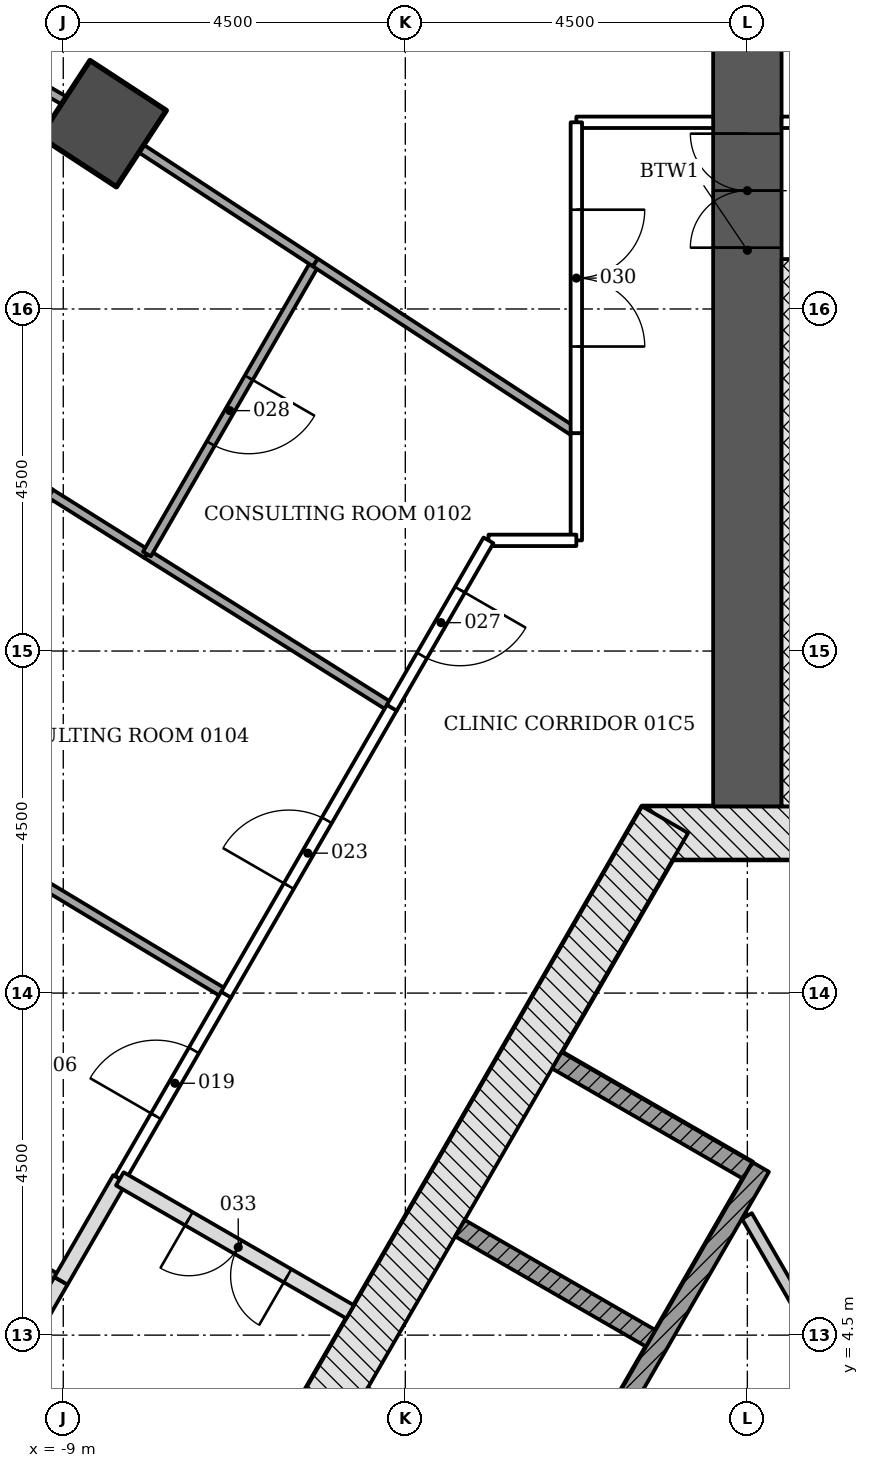
"""IFC4 building model, lengths in metres.
Left out: names, types, materials, properties, quantities, classifications, styles, units other than length and angle.
Written with IfcOpenShell. Run it as: python <this file> out.ifc"""

import sys

from ifc_helpers import new_model, si_unit, direction, frame, frame_2d, origin, origin_2d, place, context, subcontext, project, spatial, rectangle, extrude, element, fill, save


model = new_model("IFC4")
c1 = context("Model", 3, precision=1e-05, world=origin(), true_north=direction((0.0, 1.0)))
c2 = subcontext(c1, "Body", "Model", "MODEL_VIEW")
j1 = project(units=[si_unit("LENGTHUNIT", "METRE"), si_unit("PLANEANGLEUNIT", "RADIAN")], contexts=[c1])
p1 = place(None, origin())
s1 = spatial("IfcSite", under=j1, at=p1, CompositionType="ELEMENT")
p2 = place(p1, origin())
s2 = spatial("IfcBuilding", under=s1, at=p2, CompositionType="ELEMENT")
p3 = place(p2, frame((0.0, 0.0, 6.0)))
s3 = spatial("IfcBuildingStorey", under=s2, at=p3, CompositionType="ELEMENT", Elevation=6.0)
p4 = place(p3, frame((-8.475, 20.438, -0.25), z_axis=(0.0, 0.0, 1.0), x_axis=(-0.836867705394, 0.547405191489, 0.0)))
e1 = element("IfcColumn", 1, at=p4, inside=s3, PredefinedType="COLUMN", context=c2, shape_type="SweptSolid", body=[
    extrude(rectangle(XDim=1.2, YDim=1.2, at=origin_2d()), origin(), (0.0, 0.0, 1.0), 4.5),
])
p5 = place(p3, frame((1.386, 11.106, -0.25), z_axis=(0.0, 0.0, 1.0), x_axis=(-1.0, 0.0, 0.0)))
e2 = element("IfcWall", 2, at=p5, inside=s3, PredefinedType="SHEAR", context=c2, shape_type="SweptSolid", body=[
    extrude(rectangle(XDim=2.771, YDim=0.7, at=frame_2d((1.386, 0.0))), origin(), (0.0, 0.0, 1.0), 4.5),
])
p6 = place(p3, frame((-1.083, 11.281, -0.25), z_axis=(0.0, 0.0, 1.0), x_axis=(-0.500001446645, -0.866024568562, 0.0)))
e3 = element("IfcWall", 3, at=p6, inside=s3, PredefinedType="SHEAR", context=c2, shape_type="SweptSolid", body=[
    extrude(rectangle(XDim=18.458, YDim=0.7, at=frame_2d((9.229, 0.0))), origin(), (0.0, 0.0, 1.0), 4.5),
])
p7 = place(p6, frame((8.979, 0.0, 0.25)))
e4 = element("IfcOpeningElement", 4, at=p7, cuts=e3, PredefinedType="OPENING", context=c2, shape_type="SweptSolid", body=[
    extrude(rectangle(XDim=1.2, YDim=2.1, at=frame_2d((0.6, 1.05))), frame((0.0, 0.36, 0.0), z_axis=(0.0, -1.0, 0.0), x_axis=(1.0, 0.0, 0.0)), (0.0, 0.0, 1.0), 0.72),
])
p8 = place(p6, frame((11.029, 0.0, 0.25)))
e5 = element("IfcOpeningElement", 5, at=p8, cuts=e3, PredefinedType="OPENING", context=c2, shape_type="SweptSolid", body=[
    extrude(rectangle(XDim=1.2, YDim=2.1, at=frame_2d((0.6, 1.05))), frame((0.0, 0.36, 0.0), z_axis=(0.0, -1.0, 0.0), x_axis=(1.0, 0.0, 0.0)), (0.0, 0.0, 1.0), 0.72),
])
p9 = place(p3, frame((0.0, 11.456, -0.25), z_axis=(0.0, 0.0, 1.0), x_axis=(0.0, 1.0, 0.0)))
e6 = element("IfcWall", 6, at=p9, inside=s3, PredefinedType="SHEAR", context=c2, shape_type="SweptSolid", body=[
    extrude(rectangle(XDim=14.633, YDim=0.9, at=frame_2d((7.316, 0.0))), origin(), (0.0, 0.0, 1.0), 4.5),
])
p10 = place(p9, frame((7.35, 0.0, 0.25)))
e7 = element("IfcOpeningElement", 7, at=p10, cuts=e6, PredefinedType="OPENING", context=c2, shape_type="SweptSolid", body=[
    extrude(rectangle(XDim=1.5, YDim=2.1, at=frame_2d((0.75, 1.05))), frame((0.0, 0.46, 0.0), z_axis=(0.0, -1.0, 0.0), x_axis=(1.0, 0.0, 0.0)), (0.0, 0.0, 1.0), 0.92),
])
p11 = place(p3, frame((-2.506, 8.115, -0.25), z_axis=(0.0, 0.0, 1.0), x_axis=(0.865996321171, -0.50005036918, 0.0)))
e8 = element("IfcWall", 8, at=p11, inside=s3, PredefinedType="PARTITIONING", context=c2, shape_type="SweptSolid", body=[
    extrude(rectangle(XDim=2.9, YDim=0.25, at=frame_2d((1.45, 0.0))), origin(), (0.0, 0.0, 1.0), 4.5),
])
for number, where, z_axis, x_axis in (
    (9, (-3.781, 5.907, -0.25), (0.0, 0.0, 1.0), (0.866, -0.5, 0.0)),
    (10, (-5.056, 3.699, -0.25), (0.0, 0.0, 1.0), (0.866, -0.5, 0.0)),
):
    element("IfcWall", number, at=place(p3, frame(where, z_axis=z_axis, x_axis=x_axis)), inside=s3, PredefinedType="PARTITIONING", context=c2, shape_type="SweptSolid", body=[
        extrude(rectangle(XDim=2.9, YDim=0.25, at=frame_2d((1.45, 0.0))), origin(), (0.0, 0.0, 1.0), 4.5),
    ])
p12 = place(p3, frame((0.176, 6.711, 0.0), z_axis=(0.0, 0.0, 1.0), x_axis=(-0.500004227369, -0.866022963098, 0.0)))
e11 = element("IfcWall", 11, at=p12, inside=s3, PredefinedType="PARTITIONING", context=c2, shape_type="SweptSolid", body=[
    extrude(rectangle(XDim=11.8, YDim=0.25, at=frame_2d((5.9, 0.0))), origin(), (0.0, 0.0, 1.0), 4.25),
])
p13 = place(p3, frame((2.099, 2.42, 0.0), z_axis=(0.0, 0.0, 1.0), x_axis=(-0.499998449073, 0.866026299211, 0.0)))
e12 = element("IfcWall", 12, at=p13, inside=s3, PredefinedType="PARTITIONING", context=c2, shape_type="SweptSolid", body=[
    extrude(rectangle(XDim=4.211, YDim=0.15, at=frame_2d((2.106, 0.0))), origin(), (0.0, 0.0, 1.0), 4.25),
])
p14 = place(p3, frame((1.018, 11.456, -0.25), z_axis=(0.0, 0.0, 1.0), x_axis=(0.0, 1.0, 0.0)))
e13 = element("IfcWall", 13, at=p14, inside=s3, PredefinedType="SHEAR", context=c2, shape_type="SweptSolid", body=[
    extrude(rectangle(XDim=7.2, YDim=1.136, at=frame_2d((3.6, 0.0))), origin(), (0.0, 0.0, 1.0), 4.5),
])
p15 = place(p3, frame((-9.031, 5.213, 0.0), z_axis=(0.0, 0.0, 1.0), x_axis=(-0.500044734646, -0.865999574684, 0.0)))
e14 = element("IfcWall", 14, at=p15, inside=s3, PredefinedType="PARTITIONING", context=c2, shape_type="SweptSolid", body=[
    extrude(rectangle(XDim=4.35, YDim=0.2, at=frame_2d((2.175, 0.0))), origin(), (0.0, 0.0, 1.0), 3.638),
])
p16 = place(p3, frame((-8.256, 6.555, 0.0), z_axis=(0.0, 0.0, 1.0), x_axis=(-0.500177701192, -0.865922783642, 0.0)))
e15 = element("IfcWall", 15, at=p16, inside=s3, PredefinedType="PARTITIONING", context=c2, shape_type="SweptSolid", body=[
    extrude(rectangle(XDim=1.547, YDim=0.2, at=frame_2d((0.774, 0.0))), origin(), (0.0, 0.0, 1.0), 3.638),
])
p17 = place(p3, frame((-5.226, 4.806, 0.0), z_axis=(0.0, 0.0, 1.0), x_axis=(-0.865949687125, 0.500131122175, 0.0)))
e16 = element("IfcWall", 16, at=p17, inside=s3, PredefinedType="PARTITIONING", context=c2, shape_type="SweptSolid", body=[
    extrude(rectangle(XDim=3.499, YDim=0.2, at=frame_2d((1.75, 0.0))), origin(), (0.0, 0.0, 1.0), 4.25),
])
p18 = place(p17, frame((0.95, 0.0, 0.0)))
e17 = element("IfcOpeningElement", 17, at=p18, cuts=e16, PredefinedType="OPENING", context=c2, shape_type="SweptSolid", body=[
    extrude(rectangle(XDim=1.5, YDim=2.1, at=frame_2d((0.75, 1.05))), frame((0.0, 0.11, 0.0), z_axis=(0.0, -1.0, 0.0), x_axis=(1.0, 0.0, 0.0)), (0.0, 0.0, 1.0), 0.22),
])
p19 = place(p3, frame((7.136, 20.456, 0.0), z_axis=(0.0, 0.0, 1.0), x_axis=(-1.0, 0.0, 0.0)))
e18 = element("IfcWall", 18, at=p19, inside=s3, PredefinedType="PARTITIONING", context=c2, shape_type="SweptSolid", body=[
    extrude(rectangle(XDim=6.686, YDim=0.15, at=frame_2d((3.343, 0.0))), origin(), (0.0, 0.0, 1.0), 3.638),
])
p20 = place(p19, frame((2.45, 0.0, 0.0)))
e19 = element("IfcOpeningElement", 19, at=p20, cuts=e18, PredefinedType="OPENING", context=c2, shape_type="SweptSolid", body=[
    extrude(rectangle(XDim=1.8, YDim=2.1, at=frame_2d((0.9, 1.05))), frame((0.0, 0.085, 0.0), z_axis=(0.0, -1.0, 0.0), x_axis=(1.0, 0.0, 0.0)), (0.0, 0.0, 1.0), 0.17),
])
p21 = place(p3, frame((-9.032, 5.215, 0.0), z_axis=(0.0, 0.0, 1.0), x_axis=(-0.866130767322, 0.499817460578, 0.0)))
e20 = element("IfcWall", 20, at=p21, inside=s3, PredefinedType="PARTITIONING", context=c2, shape_type="SweptSolid", body=[
    extrude(rectangle(XDim=4.597, YDim=0.12, at=frame_2d((2.299, 0.0))), origin(), (0.0, 0.0, 1.0), 3.638),
])
p22 = place(p3, frame((-6.857, 8.983, 0.0), z_axis=(0.0, 0.0, 1.0), x_axis=(-0.856751730158, 0.515729069251, 0.0)))
e21 = element("IfcWall", 21, at=p22, inside=s3, PredefinedType="PARTITIONING", context=c2, shape_type="SweptSolid", body=[
    extrude(rectangle(XDim=4.598, YDim=0.12, at=frame_2d((2.299, 0.0))), origin(), (0.0, 0.0, 1.0), 3.638),
])
p23 = place(p3, frame((-8.256, 6.558, 0.0), z_axis=(0.0, 0.0, 1.0), x_axis=(0.500081734942, 0.86597820895, 0.0)))
e22 = element("IfcWall", 22, at=p23, inside=s3, PredefinedType="PARTITIONING", context=c2, shape_type="SweptSolid", body=[
    extrude(rectangle(XDim=2.804, YDim=0.15, at=frame_2d((1.402, 0.0))), origin(), (0.0, 0.0, 1.0), 3.638),
])
p24 = place(p23, frame((0.95, 0.0, 0.0)))
e23 = element("IfcOpeningElement", 23, at=p24, cuts=e22, PredefinedType="OPENING", context=c2, shape_type="SweptSolid", body=[
    extrude(rectangle(XDim=1.0, YDim=2.1, at=frame_2d((0.5, 1.05))), frame((0.0, 0.085, 0.0), z_axis=(0.0, -1.0, 0.0), x_axis=(1.0, 0.0, 0.0)), (0.0, 0.0, 1.0), 0.17),
])
p25 = place(p3, frame((-6.858, 8.979, 0.0), z_axis=(0.0, 0.0, 1.0), x_axis=(0.500105111742, 0.865964708986, 0.0)))
e24 = element("IfcWall", 24, at=p25, inside=s3, PredefinedType="PARTITIONING", context=c2, shape_type="SweptSolid", body=[
    extrude(rectangle(XDim=4.363, YDim=0.15, at=frame_2d((2.181, 0.0))), origin(), (0.0, 0.0, 1.0), 3.638),
])
p26 = place(p25, frame((1.65, 0.0, 0.0)))
e25 = element("IfcOpeningElement", 25, at=p26, cuts=e24, PredefinedType="OPENING", context=c2, shape_type="SweptSolid", body=[
    extrude(rectangle(XDim=1.0, YDim=2.1, at=frame_2d((0.5, 1.05))), frame((0.0, 0.085, 0.0), z_axis=(0.0, -1.0, 0.0), x_axis=(1.0, 0.0, 0.0)), (0.0, 0.0, 1.0), 0.17),
])
p27 = place(p3, frame((-9.17, 15.572, 0.0), z_axis=(0.0, 0.0, 1.0), x_axis=(-0.499902881486, -0.866081467924, 0.0)))
e26 = element("IfcWall", 26, at=p27, inside=s3, PredefinedType="PARTITIONING", context=c2, shape_type="SweptSolid", body=[
    extrude(rectangle(XDim=4.451, YDim=0.12, at=frame_2d((2.226, 0.0))), origin(), (0.0, 0.0, 1.0), 3.638),
])
p28 = place(p27, frame((1.75, 0.0, 0.0)))
e27 = element("IfcOpeningElement", 27, at=p28, cuts=e26, PredefinedType="OPENING", context=c2, shape_type="SweptSolid", body=[
    extrude(rectangle(XDim=1.0, YDim=2.1, at=frame_2d((0.5, 1.05))), frame((0.0, 0.07, 0.0), z_axis=(0.0, -1.0, 0.0), x_axis=(1.0, 0.0, 0.0)), (0.0, 0.0, 1.0), 0.14),
])
p29 = place(p3, frame((-4.68, 12.753, 0.0), z_axis=(0.0, 0.0, 1.0), x_axis=(-0.846844902979, 0.531839929206, 0.0)))
e28 = element("IfcWall", 28, at=p29, inside=s3, PredefinedType="PARTITIONING", context=c2, shape_type="SweptSolid", body=[
    extrude(rectangle(XDim=3.8, YDim=0.12, at=frame_2d((1.9, 0.0))), origin(), (0.0, 0.0, 1.0), 3.638),
])
p30 = place(p3, frame((-7.901, 14.776, 0.0), z_axis=(0.0, 0.0, 1.0), x_axis=(-0.847002237732, 0.531589323892, 0.0)))
e29 = element("IfcWall", 29, at=p30, inside=s3, PredefinedType="PARTITIONING", context=c2, shape_type="SweptSolid", body=[
    extrude(rectangle(XDim=1.503, YDim=0.12, at=frame_2d((0.751, 0.0))), origin(), (0.0, 0.0, 1.0), 3.638),
])
p31 = place(p3, frame((-2.25, 16.366, 0.0), z_axis=(0.0, 0.0, 1.0), x_axis=(0.0, -1.0, 0.0)))
e30 = element("IfcWall", 30, at=p31, inside=s3, PredefinedType="PARTITIONING", context=c2, shape_type="SweptSolid", body=[
    extrude(rectangle(XDim=1.41, YDim=0.15, at=frame_2d((0.705, 0.0))), origin(), (0.0, 0.0, 1.0), 3.638),
])
p32 = place(p3, frame((-2.25, 14.956, 0.0), z_axis=(0.0, 0.0, 1.0), x_axis=(-1.0, 0.0, 0.0)))
e31 = element("IfcWall", 31, at=p32, inside=s3, PredefinedType="PARTITIONING", context=c2, shape_type="SweptSolid", body=[
    extrude(rectangle(XDim=1.156, YDim=0.15, at=frame_2d((0.578, 0.0))), origin(), (0.0, 0.0, 1.0), 4.25),
])
p33 = place(p3, frame((-3.406, 14.956, 0.0), z_axis=(0.0, 0.0, 1.0), x_axis=(-0.499999364504, -0.866025770688, 0.0)))
e32 = element("IfcWall", 32, at=p33, inside=s3, PredefinedType="PARTITIONING", context=c2, shape_type="SweptSolid", body=[
    extrude(rectangle(XDim=2.544, YDim=0.15, at=frame_2d((1.272, 0.0))), origin(), (0.0, 0.0, 1.0), 3.638),
])
p34 = place(p33, frame((0.75, 0.0, 0.0)))
e33 = element("IfcOpeningElement", 33, at=p34, cuts=e32, PredefinedType="OPENING", context=c2, shape_type="SweptSolid", body=[
    extrude(rectangle(XDim=1.0, YDim=2.1, at=frame_2d((0.5, 1.05))), frame((0.0, 0.085, 0.0), z_axis=(0.0, -1.0, 0.0), x_axis=(1.0, 0.0, 0.0)), (0.0, 0.0, 1.0), 0.17),
])
p35 = place(p3, frame((-0.45, 20.456, 0.0), z_axis=(0.0, 0.0, 1.0), x_axis=(-1.0, 0.0, 0.0)))
e34 = element("IfcWall", 34, at=p35, inside=s3, PredefinedType="PARTITIONING", context=c2, shape_type="SweptSolid", body=[
    extrude(rectangle(XDim=1.8, YDim=0.15, at=frame_2d((0.9, 0.0))), origin(), (0.0, 0.0, 1.0), 3.638),
])
p36 = place(p3, frame((-2.25, 20.456, 0.0), z_axis=(0.0, 0.0, 1.0), x_axis=(0.0, -1.0, 0.0)))
e35 = element("IfcWall", 35, at=p36, inside=s3, PredefinedType="PARTITIONING", context=c2, shape_type="SweptSolid", body=[
    extrude(rectangle(XDim=4.089, YDim=0.15, at=frame_2d((2.044, 0.0))), origin(), (0.0, 0.0, 1.0), 3.638),
])
p37 = place(p36, frame((1.15, 0.0, 0.0)))
e36 = element("IfcOpeningElement", 36, at=p37, cuts=e35, PredefinedType="OPENING", context=c2, shape_type="SweptSolid", body=[
    extrude(rectangle(XDim=1.8, YDim=2.1, at=frame_2d((0.9, 1.05))), frame((0.0, 0.085, 0.0), z_axis=(0.0, -1.0, 0.0), x_axis=(1.0, 0.0, 0.0)), (0.0, 0.0, 1.0), 0.17),
])
p38 = place(p3, frame((-9.166, 15.571, 0.0), z_axis=(0.0, 0.0, 1.0), x_axis=(-0.84701751501, 0.531564981227, 0.0)))
e37 = element("IfcWall", 37, at=p38, inside=s3, PredefinedType="PARTITIONING", context=c2, shape_type="SweptSolid", body=[
    extrude(rectangle(XDim=2.045, YDim=0.12, at=frame_2d((1.022, 0.0))), origin(), (0.0, 0.0, 1.0), 3.638),
])
p39 = place(p3, frame((-5.684, 18.611, 0.0), z_axis=(0.0, 0.0, 1.0), x_axis=(-0.500099413844, -0.865967999567, 0.0)))
e38 = element("IfcWall", 38, at=p39, inside=s3, PredefinedType="PARTITIONING", context=c2, shape_type="SweptSolid", body=[
    extrude(rectangle(XDim=4.429, YDim=0.12, at=frame_2d((2.214, 0.0))), origin(), (0.0, 0.0, 1.0), 3.638),
])
p40 = place(p39, frame((1.75, 0.0, 0.0)))
e39 = element("IfcOpeningElement", 39, at=p40, cuts=e38, PredefinedType="OPENING", context=c2, shape_type="SweptSolid", body=[
    extrude(rectangle(XDim=1.0, YDim=2.1, at=frame_2d((0.5, 1.05))), frame((0.0, 0.07, 0.0), z_axis=(0.0, -1.0, 0.0), x_axis=(1.0, 0.0, 0.0)), (0.0, 0.0, 1.0), 0.14),
])
p41 = place(p3, frame((-2.252, 16.367, 0.0), z_axis=(0.0, 0.0, 1.0), x_axis=(-0.836925574982, 0.547316710819, 0.0)))
e40 = element("IfcWall", 40, at=p41, inside=s3, PredefinedType="PARTITIONING", context=c2, shape_type="SweptSolid", body=[
    extrude(rectangle(XDim=4.102, YDim=0.12, at=frame_2d((2.051, 0.0))), origin(), (0.0, 0.0, 1.0), 3.638),
])
p42 = place(p3, frame((-8.992, 20.743, 0.0), z_axis=(0.0, 0.0, 1.0), x_axis=(-0.861228913487, 0.508217235613, 0.0)))
e41 = element("IfcWall", 41, at=p42, inside=s3, PredefinedType="PARTITIONING", context=c2, shape_type="SweptSolid", body=[
    extrude(rectangle(XDim=2.94, YDim=0.12, at=frame_2d((1.47, 0.0))), origin(), (0.0, 0.0, 1.0), 3.633),
])
p43 = place(p3, frame((-5.685, 18.612, 0.0), z_axis=(0.0, 0.0, 1.0), x_axis=(-0.836813840242, 0.547487531163, 0.0)))
e42 = element("IfcWall", 42, at=p43, inside=s3, PredefinedType="PARTITIONING", context=c2, shape_type="SweptSolid", body=[
    extrude(rectangle(XDim=2.734, YDim=0.12, at=frame_2d((1.367, 0.0))), origin(), (0.0, 0.0, 1.0), 3.638),
])
p44 = place(p24, origin())
e43 = element("IfcDoor", 43, at=p44, inside=s3, OperationType="SINGLE_SWING_RIGHT", PredefinedType="DOOR", context=c2, shape_type="SweptSolid", body=[
    extrude(rectangle(XDim=1.0, YDim=2.1, at=frame_2d((0.5, 1.05))), frame((0.0, 0.025, 0.0), z_axis=(0.0, -1.0, 0.0), x_axis=(1.0, 0.0, 0.0)), (0.0, 0.0, 1.0), 0.05),
])
fill(e23, e43)
p45 = place(p26, origin())
e44 = element("IfcDoor", 44, at=p45, inside=s3, OperationType="SINGLE_SWING_LEFT", PredefinedType="DOOR", context=c2, shape_type="SweptSolid", body=[
    extrude(rectangle(XDim=1.0, YDim=2.1, at=frame_2d((0.5, 1.05))), frame((0.0, 0.025, 0.0), z_axis=(0.0, -1.0, 0.0), x_axis=(1.0, 0.0, 0.0)), (0.0, 0.0, 1.0), 0.05),
])
fill(e25, e44)
p46 = place(p34, origin())
e45 = element("IfcDoor", 45, at=p46, inside=s3, OperationType="SINGLE_SWING_RIGHT", PredefinedType="DOOR", context=c2, shape_type="SweptSolid", body=[
    extrude(rectangle(XDim=1.0, YDim=2.1, at=frame_2d((0.5, 1.05))), frame((0.0, 0.025, 0.0), z_axis=(0.0, -1.0, 0.0), x_axis=(1.0, 0.0, 0.0)), (0.0, 0.0, 1.0), 0.05),
])
fill(e33, e45)
p47 = place(p40, origin())
e46 = element("IfcDoor", 46, at=p47, inside=s3, OperationType="SINGLE_SWING_LEFT", PredefinedType="DOOR", context=c2, shape_type="SweptSolid", body=[
    extrude(rectangle(XDim=1.0, YDim=2.1, at=frame_2d((0.5, 1.05))), frame((0.0, 0.025, 0.0), z_axis=(0.0, -1.0, 0.0), x_axis=(1.0, 0.0, 0.0)), (0.0, 0.0, 1.0), 0.05),
])
fill(e39, e46)
p48 = place(p37, origin())
e47 = element("IfcDoor", 47, at=p48, inside=s3, OperationType="DOUBLE_DOOR_SINGLE_SWING", PredefinedType="DOOR", context=c2, shape_type="SweptSolid", body=[
    extrude(rectangle(XDim=1.8, YDim=2.1, at=frame_2d((0.9, 1.05))), frame((0.0, 0.025, 0.0), z_axis=(0.0, -1.0, 0.0), x_axis=(1.0, 0.0, 0.0)), (0.0, 0.0, 1.0), 0.05),
])
fill(e36, e47)
p49 = place(p18, origin())
e48 = element("IfcDoor", 48, at=p49, inside=s3, OperationType="DOUBLE_DOOR_SINGLE_SWING", PredefinedType="DOOR", context=c2, shape_type="SweptSolid", body=[
    extrude(rectangle(XDim=1.5, YDim=2.1, at=frame_2d((0.75, 1.05))), frame((0.0, 0.025, 0.0), z_axis=(0.0, -1.0, 0.0), x_axis=(1.0, 0.0, 0.0)), (0.0, 0.0, 1.0), 0.05),
])
fill(e17, e48)
p50 = place(p10, origin())
e49 = element("IfcDoor", 49, at=p50, inside=s3, OperationType="DOUBLE_DOOR_SINGLE_SWING", PredefinedType="DOOR", context=c2, shape_type="SweptSolid", body=[
    extrude(rectangle(XDim=1.5, YDim=2.1, at=frame_2d((0.75, 1.05))), frame((0.0, 0.025, 0.0), z_axis=(0.0, -1.0, 0.0), x_axis=(1.0, 0.0, 0.0)), (0.0, 0.0, 1.0), 0.05),
])
fill(e7, e49)
save(model, sys.argv[1])
